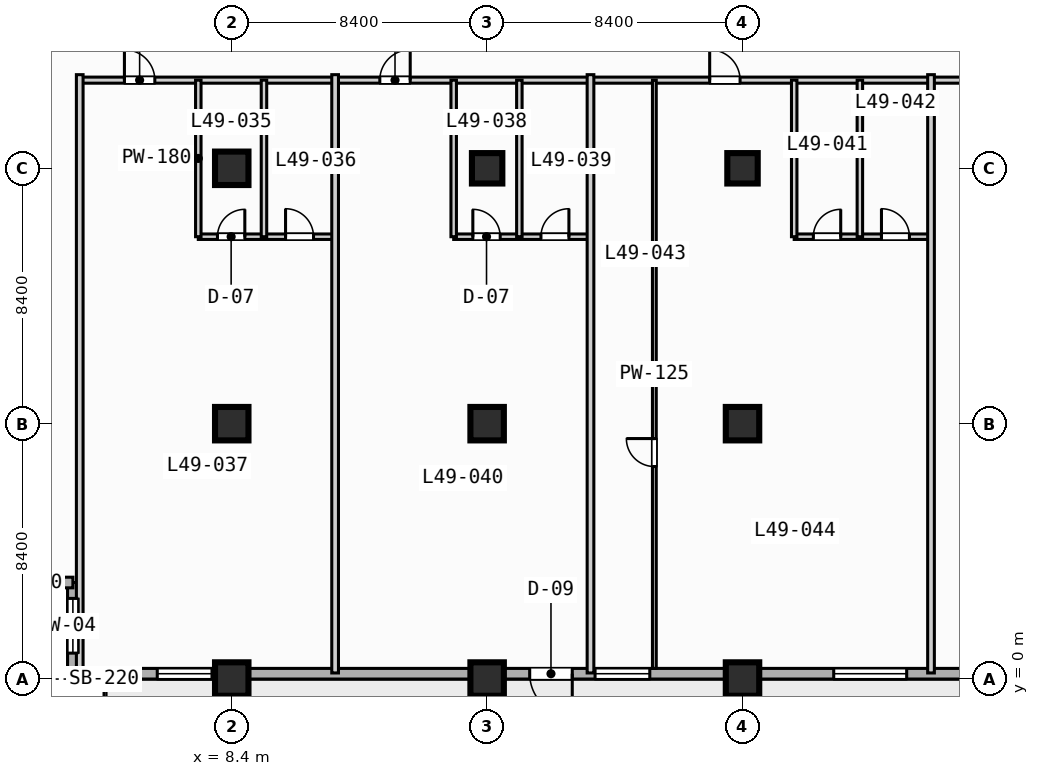
"""IFC4 building model, lengths in metres.
Left out: names, types, materials, properties, quantities, classifications, styles, units other than length and angle.
Written with IfcOpenShell. Run it as: python <this file> out.ifc"""

import sys

from ifc_helpers import new_model, si_unit, direction, frame, frame_2d, origin, origin_2d, place, context, subcontext, project, spatial, rectangle, extrude, element, fill, save


model = new_model("IFC4")
c1 = context("Model", 3, precision=1e-05, world=origin(), true_north=direction((0.0, 1.0)))
c2 = subcontext(c1, "Body", "Model", "MODEL_VIEW")
j1 = project(units=[si_unit("LENGTHUNIT", "METRE"), si_unit("PLANEANGLEUNIT", "RADIAN")], contexts=[c1])
p1 = place(None, origin())
s1 = spatial("IfcSite", under=j1, at=p1, CompositionType="ELEMENT")
p2 = place(p1, origin())
s2 = spatial("IfcBuilding", under=s1, at=p2, CompositionType="ELEMENT")
p3 = place(p2, frame((0.0, 0.0, 201.3)))
s3 = spatial("IfcBuildingStorey", under=s2, at=p3, CompositionType="ELEMENT", Elevation=201.3)
for number, where, z_axis, x_axis in (
    (1, (8.4, 0.0, 0.0), (0.0, 0.0, 1.0), (1.0, 0.0, 0.0)),
    (2, (8.4, 8.4, 0.0), (0.0, 0.0, 1.0), (1.0, 0.0, 0.0)),
    (3, (8.4, 16.8, 0.0), (0.0, 0.0, 1.0), (1.0, 0.0, 0.0)),
    (4, (16.8, 0.0, 0.0), (0.0, 0.0, 1.0), (1.0, 0.0, 0.0)),
    (5, (16.8, 8.4, 0.0), (0.0, 0.0, 1.0), (1.0, 0.0, 0.0)),
):
    element("IfcColumn", number, at=place(p3, frame(where, z_axis=z_axis, x_axis=x_axis)), inside=s3, PredefinedType="COLUMN", context=c2, shape_type="SweptSolid", body=[
        extrude(rectangle(XDim=1.1, YDim=1.1, at=origin_2d()), origin(), (0.0, 0.0, 1.0), 3.7),
    ])
p4 = place(p3, frame((16.8, 16.8, 0.0), z_axis=(0.0, 0.0, 1.0), x_axis=(1.0, 0.0, 0.0)))
e6 = element("IfcColumn", 6, at=p4, inside=s3, PredefinedType="COLUMN", context=c2, shape_type="SweptSolid", body=[
    extrude(rectangle(XDim=1.0, YDim=1.0, at=origin_2d()), origin(), (0.0, 0.0, 1.0), 3.7),
])
for number, where, z_axis, x_axis in (
    (7, (25.2, 0.0, 0.0), (0.0, 0.0, 1.0), (1.0, 0.0, 0.0)),
    (8, (25.2, 8.4, 0.0), (0.0, 0.0, 1.0), (1.0, 0.0, 0.0)),
):
    element("IfcColumn", number, at=place(p3, frame(where, z_axis=z_axis, x_axis=x_axis)), inside=s3, PredefinedType="COLUMN", context=c2, shape_type="SweptSolid", body=[
        extrude(rectangle(XDim=1.1, YDim=1.1, at=origin_2d()), origin(), (0.0, 0.0, 1.0), 3.7),
    ])
p5 = place(p3, frame((25.2, 16.8, 0.0), z_axis=(0.0, 0.0, 1.0), x_axis=(1.0, 0.0, 0.0)))
e9 = element("IfcColumn", 9, at=p5, inside=s3, PredefinedType="COLUMN", context=c2, shape_type="SweptSolid", body=[
    extrude(rectangle(XDim=1.0, YDim=1.0, at=origin_2d()), origin(), (0.0, 0.0, 1.0), 3.7),
])
p6 = place(p3, frame((3.175, 0.175, 0.0), z_axis=(0.0, 0.0, 1.0), x_axis=(0.0, 1.0, 0.0)))
e10 = element("IfcWall", 10, at=p6, inside=s3, PredefinedType="STANDARD", context=c2, shape_type="SweptSolid", body=[
    extrude(rectangle(XDim=3.0, YDim=0.35, at=frame_2d((1.5, 0.0))), origin(), (0.0, 0.0, 1.0), 3.47),
])
p7 = place(p6, frame((0.677, 0.0, 0.85)))
e11 = element("IfcOpeningElement", 11, at=p7, cuts=e10, PredefinedType="OPENING", context=c2, shape_type="SweptSolid", body=[
    extrude(rectangle(XDim=1.8, YDim=1.8, at=frame_2d((0.9, 0.9))), frame((0.0, 0.185, 0.0), z_axis=(0.0, -1.0, 0.0), x_axis=(1.0, 0.0, 0.0)), (0.0, 0.0, 1.0), 0.37),
])
p8 = place(p3, frame((3.175, 3.175, 0.0), z_axis=(0.0, 0.0, 1.0), x_axis=(-1.0, 0.0, 0.0)))
e12 = element("IfcWall", 12, at=p8, inside=s3, PredefinedType="STANDARD", context=c2, shape_type="SweptSolid", body=[
    extrude(rectangle(XDim=3.0, YDim=0.35, at=frame_2d((1.5, 0.0))), origin(), (0.0, 0.0, 1.0), 3.47),
])
p9 = place(p3, frame((72.425, 0.175, 0.0), z_axis=(0.0, 0.0, 1.0), x_axis=(-1.0, 0.0, 0.0)))
e13 = element("IfcWall", 13, at=p9, inside=s3, PredefinedType="STANDARD", context=c2, shape_type="SweptSolid", body=[
    extrude(rectangle(XDim=69.25, YDim=0.35, at=frame_2d((34.625, 0.0))), origin(), (0.0, 0.0, 1.0), 3.47),
])
p10 = place(p9, frame((52.825, 0.0, 0.0)))
e14 = element("IfcOpeningElement", 14, at=p10, cuts=e13, PredefinedType="OPENING", context=c2, shape_type="SweptSolid", body=[
    extrude(rectangle(XDim=1.4, YDim=2.2, at=frame_2d((0.7, 1.1))), frame((0.0, 0.185, 0.0), z_axis=(0.0, -1.0, 0.0), x_axis=(1.0, 0.0, 0.0)), (0.0, 0.0, 1.0), 0.37),
])
p11 = place(p9, frame((41.825, 0.0, 0.85)))
e15 = element("IfcOpeningElement", 15, at=p11, cuts=e13, PredefinedType="OPENING", context=c2, shape_type="SweptSolid", body=[
    extrude(rectangle(XDim=2.4, YDim=1.95, at=frame_2d((1.2, 0.975))), frame((0.0, 0.185, 0.0), z_axis=(0.0, -1.0, 0.0), x_axis=(1.0, 0.0, 0.0)), (0.0, 0.0, 1.0), 0.37),
])
p12 = place(p9, frame((33.725, 0.0, 0.85)))
e16 = element("IfcOpeningElement", 16, at=p12, cuts=e13, PredefinedType="OPENING", context=c2, shape_type="SweptSolid", body=[
    extrude(rectangle(XDim=1.8, YDim=1.8, at=frame_2d((0.9, 0.9))), frame((0.0, 0.185, 0.0), z_axis=(0.0, -1.0, 0.0), x_axis=(1.0, 0.0, 0.0)), (0.0, 0.0, 1.0), 0.37),
])
p13 = place(p9, frame((25.025, 0.0, 0.85)))
e17 = element("IfcOpeningElement", 17, at=p13, cuts=e13, PredefinedType="OPENING", context=c2, shape_type="SweptSolid", body=[
    extrude(rectangle(XDim=2.4, YDim=1.95, at=frame_2d((1.2, 0.975))), frame((0.0, 0.185, 0.0), z_axis=(0.0, -1.0, 0.0), x_axis=(1.0, 0.0, 0.0)), (0.0, 0.0, 1.0), 0.37),
])
p14 = place(p9, frame((64.675, 0.0, 0.85)))
e18 = element("IfcOpeningElement", 18, at=p14, cuts=e13, PredefinedType="OPENING", context=c2, shape_type="SweptSolid", body=[
    extrude(rectangle(XDim=1.8, YDim=1.8, at=frame_2d((0.9, 0.9))), frame((0.0, 0.185, 0.0), z_axis=(0.0, -1.0, 0.0), x_axis=(1.0, 0.0, 0.0)), (0.0, 0.0, 1.0), 0.37),
])
p15 = place(p9, frame((50.275, 0.0, 0.85)))
e19 = element("IfcOpeningElement", 19, at=p15, cuts=e13, PredefinedType="OPENING", context=c2, shape_type="SweptSolid", body=[
    extrude(rectangle(XDim=1.8, YDim=1.8, at=frame_2d((0.9, 0.9))), frame((0.0, 0.185, 0.0), z_axis=(0.0, -1.0, 0.0), x_axis=(1.0, 0.0, 0.0)), (0.0, 0.0, 1.0), 0.37),
])
p16 = place(p3, frame((3.4, 19.7, 0.0), z_axis=(0.0, 0.0, 1.0), x_axis=(1.0, 0.0, 0.0)))
e20 = element("IfcWall", 20, at=p16, inside=s3, PredefinedType="PARTITIONING", context=c2, shape_type="SweptSolid", body=[
    extrude(rectangle(XDim=35.8, YDim=0.2, at=frame_2d((17.9, 0.0))), origin(), (0.0, 0.0, 1.0), 3.47),
])
p17 = place(p16, frame((1.47, 0.0, 0.0)))
e21 = element("IfcOpeningElement", 21, at=p17, cuts=e20, PredefinedType="OPENING", context=c2, shape_type="SweptSolid", body=[
    extrude(rectangle(XDim=1.0, YDim=2.15, at=frame_2d((0.5, 1.075))), frame((0.0, 0.11, 0.0), z_axis=(0.0, -1.0, 0.0), x_axis=(1.0, 0.0, 0.0)), (0.0, 0.0, 1.0), 0.22),
])
p18 = place(p16, frame((9.87, 0.0, 0.0)))
e22 = element("IfcOpeningElement", 22, at=p18, cuts=e20, PredefinedType="OPENING", context=c2, shape_type="SweptSolid", body=[
    extrude(rectangle(XDim=1.0, YDim=2.15, at=frame_2d((0.5, 1.075))), frame((0.0, 0.11, 0.0), z_axis=(0.0, -1.0, 0.0), x_axis=(1.0, 0.0, 0.0)), (0.0, 0.0, 1.0), 0.22),
])
p19 = place(p16, frame((20.72, 0.0, 0.0)))
e23 = element("IfcOpeningElement", 23, at=p19, cuts=e20, PredefinedType="OPENING", context=c2, shape_type="SweptSolid", body=[
    extrude(rectangle(XDim=1.0, YDim=2.15, at=frame_2d((0.5, 1.075))), frame((0.0, 0.11, 0.0), z_axis=(0.0, -1.0, 0.0), x_axis=(1.0, 0.0, 0.0)), (0.0, 0.0, 1.0), 0.22),
])
p20 = place(p16, frame((29.17, 0.0, 0.0)))
e24 = element("IfcOpeningElement", 24, at=p20, cuts=e20, PredefinedType="OPENING", context=c2, shape_type="SweptSolid", body=[
    extrude(rectangle(XDim=1.0, YDim=2.15, at=frame_2d((0.5, 1.075))), frame((0.0, 0.11, 0.0), z_axis=(0.0, -1.0, 0.0), x_axis=(1.0, 0.0, 0.0)), (0.0, 0.0, 1.0), 0.22),
])
p21 = place(p3, frame((3.4, 0.2, 0.0), z_axis=(0.0, 0.0, 1.0), x_axis=(0.0, 1.0, 0.0)))
e25 = element("IfcWall", 25, at=p21, inside=s3, PredefinedType="PARTITIONING", context=c2, shape_type="SweptSolid", body=[
    extrude(rectangle(XDim=19.68, YDim=0.22, at=frame_2d((9.84, 0.0))), origin(), (0.0, 0.0, 1.0), 3.47),
])
p22 = place(p3, frame((7.3, 14.55, 0.0), z_axis=(0.0, 0.0, 1.0), x_axis=(1.0, 0.0, 0.0)))
e26 = element("IfcWall", 26, at=p22, inside=s3, PredefinedType="PLUMBINGWALL", context=c2, shape_type="SweptSolid", body=[
    extrude(rectangle(XDim=4.5, YDim=0.18, at=frame_2d((2.25, 0.0))), origin(), (0.0, 0.0, 1.0), 3.47),
])
p23 = place(p22, frame((0.63, 0.0, 0.0)))
e27 = element("IfcOpeningElement", 27, at=p23, cuts=e26, PredefinedType="OPENING", context=c2, shape_type="SweptSolid", body=[
    extrude(rectangle(XDim=0.9, YDim=2.1, at=frame_2d((0.45, 1.05))), frame((0.0, 0.1, 0.0), z_axis=(0.0, -1.0, 0.0), x_axis=(1.0, 0.0, 0.0)), (0.0, 0.0, 1.0), 0.2),
])
p24 = place(p22, frame((2.87, 0.0, 0.0)))
e28 = element("IfcOpeningElement", 28, at=p24, cuts=e26, PredefinedType="OPENING", context=c2, shape_type="SweptSolid", body=[
    extrude(rectangle(XDim=0.92, YDim=2.1, at=frame_2d((0.46, 1.05))), frame((0.0, 0.1, 0.0), z_axis=(0.0, -1.0, 0.0), x_axis=(1.0, 0.0, 0.0)), (0.0, 0.0, 1.0), 0.2),
])
for number, where, z_axis, x_axis in (
    (29, (7.3, 14.55, 0.0), (0.0, 0.0, 1.0), (0.0, 1.0, 0.0)),
    (30, (9.46, 14.55, 0.0), (0.0, 0.0, 1.0), (0.0, 1.0, 0.0)),
):
    element("IfcWall", number, at=place(p3, frame(where, z_axis=z_axis, x_axis=x_axis)), inside=s3, PredefinedType="PLUMBINGWALL", context=c2, shape_type="SweptSolid", body=[
        extrude(rectangle(XDim=5.15, YDim=0.18, at=frame_2d((2.575, 0.0))), origin(), (0.0, 0.0, 1.0), 3.47),
    ])
p25 = place(p3, frame((11.8, 0.2, 0.0), z_axis=(0.0, 0.0, 1.0), x_axis=(0.0, 1.0, 0.0)))
e31 = element("IfcWall", 31, at=p25, inside=s3, PredefinedType="PARTITIONING", context=c2, shape_type="SweptSolid", body=[
    extrude(rectangle(XDim=19.68, YDim=0.22, at=frame_2d((9.84, 0.0))), origin(), (0.0, 0.0, 1.0), 3.47),
])
p26 = place(p3, frame((15.7, 14.55, 0.0), z_axis=(0.0, 0.0, 1.0), x_axis=(1.0, 0.0, 0.0)))
e32 = element("IfcWall", 32, at=p26, inside=s3, PredefinedType="PLUMBINGWALL", context=c2, shape_type="SweptSolid", body=[
    extrude(rectangle(XDim=4.5, YDim=0.18, at=frame_2d((2.25, 0.0))), origin(), (0.0, 0.0, 1.0), 3.47),
])
p27 = place(p26, frame((0.63, 0.0, 0.0)))
e33 = element("IfcOpeningElement", 33, at=p27, cuts=e32, PredefinedType="OPENING", context=c2, shape_type="SweptSolid", body=[
    extrude(rectangle(XDim=0.9, YDim=2.1, at=frame_2d((0.45, 1.05))), frame((0.0, 0.1, 0.0), z_axis=(0.0, -1.0, 0.0), x_axis=(1.0, 0.0, 0.0)), (0.0, 0.0, 1.0), 0.2),
])
p28 = place(p26, frame((2.87, 0.0, 0.0)))
e34 = element("IfcOpeningElement", 34, at=p28, cuts=e32, PredefinedType="OPENING", context=c2, shape_type="SweptSolid", body=[
    extrude(rectangle(XDim=0.92, YDim=2.1, at=frame_2d((0.46, 1.05))), frame((0.0, 0.1, 0.0), z_axis=(0.0, -1.0, 0.0), x_axis=(1.0, 0.0, 0.0)), (0.0, 0.0, 1.0), 0.2),
])
for number, where, z_axis, x_axis in (
    (35, (15.7, 14.55, 0.0), (0.0, 0.0, 1.0), (0.0, 1.0, 0.0)),
    (36, (17.86, 14.55, 0.0), (0.0, 0.0, 1.0), (0.0, 1.0, 0.0)),
):
    element("IfcWall", number, at=place(p3, frame(where, z_axis=z_axis, x_axis=x_axis)), inside=s3, PredefinedType="PLUMBINGWALL", context=c2, shape_type="SweptSolid", body=[
        extrude(rectangle(XDim=5.15, YDim=0.18, at=frame_2d((2.575, 0.0))), origin(), (0.0, 0.0, 1.0), 3.47),
    ])
p29 = place(p3, frame((20.2, 0.2, 0.0), z_axis=(0.0, 0.0, 1.0), x_axis=(0.0, 1.0, 0.0)))
e37 = element("IfcWall", 37, at=p29, inside=s3, PredefinedType="PARTITIONING", context=c2, shape_type="SweptSolid", body=[
    extrude(rectangle(XDim=19.68, YDim=0.22, at=frame_2d((9.84, 0.0))), origin(), (0.0, 0.0, 1.0), 3.47),
])
p30 = place(p3, frame((26.9, 14.55, 0.0), z_axis=(0.0, 0.0, 1.0), x_axis=(1.0, 0.0, 0.0)))
e38 = element("IfcWall", 38, at=p30, inside=s3, PredefinedType="PLUMBINGWALL", context=c2, shape_type="SweptSolid", body=[
    extrude(rectangle(XDim=4.5, YDim=0.18, at=frame_2d((2.25, 0.0))), origin(), (0.0, 0.0, 1.0), 3.47),
])
p31 = place(p30, frame((0.63, 0.0, 0.0)))
e39 = element("IfcOpeningElement", 39, at=p31, cuts=e38, PredefinedType="OPENING", context=c2, shape_type="SweptSolid", body=[
    extrude(rectangle(XDim=0.9, YDim=2.1, at=frame_2d((0.45, 1.05))), frame((0.0, 0.1, 0.0), z_axis=(0.0, -1.0, 0.0), x_axis=(1.0, 0.0, 0.0)), (0.0, 0.0, 1.0), 0.2),
])
p32 = place(p30, frame((2.87, 0.0, 0.0)))
e40 = element("IfcOpeningElement", 40, at=p32, cuts=e38, PredefinedType="OPENING", context=c2, shape_type="SweptSolid", body=[
    extrude(rectangle(XDim=0.92, YDim=2.1, at=frame_2d((0.46, 1.05))), frame((0.0, 0.1, 0.0), z_axis=(0.0, -1.0, 0.0), x_axis=(1.0, 0.0, 0.0)), (0.0, 0.0, 1.0), 0.2),
])
for number, where, z_axis, x_axis in (
    (41, (26.9, 14.55, 0.0), (0.0, 0.0, 1.0), (0.0, 1.0, 0.0)),
    (42, (29.06, 14.55, 0.0), (0.0, 0.0, 1.0), (0.0, 1.0, 0.0)),
):
    element("IfcWall", number, at=place(p3, frame(where, z_axis=z_axis, x_axis=x_axis)), inside=s3, PredefinedType="PLUMBINGWALL", context=c2, shape_type="SweptSolid", body=[
        extrude(rectangle(XDim=5.15, YDim=0.18, at=frame_2d((2.575, 0.0))), origin(), (0.0, 0.0, 1.0), 3.47),
    ])
p33 = place(p3, frame((22.3, 0.35, 0.0), z_axis=(0.0, 0.0, 1.0), x_axis=(0.0, 1.0, 0.0)))
e43 = element("IfcWall", 43, at=p33, inside=s3, PredefinedType="PARTITIONING", context=c2, shape_type="SweptSolid", body=[
    extrude(rectangle(XDim=19.35, YDim=0.125, at=frame_2d((9.675, 0.0))), origin(), (0.0, 0.0, 1.0), 3.47),
])
p34 = place(p33, frame((6.64, 0.0, 0.0)))
e44 = element("IfcOpeningElement", 44, at=p34, cuts=e43, PredefinedType="OPENING", context=c2, shape_type="SweptSolid", body=[
    extrude(rectangle(XDim=0.92, YDim=2.1, at=frame_2d((0.46, 1.05))), frame((0.0, 0.073, 0.0), z_axis=(0.0, -1.0, 0.0), x_axis=(1.0, 0.0, 0.0)), (0.0, 0.0, 1.0), 0.145),
])
p35 = place(p3, frame((31.4, 0.2, 0.0), z_axis=(0.0, 0.0, 1.0), x_axis=(0.0, 1.0, 0.0)))
e45 = element("IfcWall", 45, at=p35, inside=s3, PredefinedType="PARTITIONING", context=c2, shape_type="SweptSolid", body=[
    extrude(rectangle(XDim=19.68, YDim=0.22, at=frame_2d((9.84, 0.0))), origin(), (0.0, 0.0, 1.0), 3.47),
])
p36 = place(p7, origin())
e46 = element("IfcWindow", 46, at=p36, inside=s3, PartitioningType="SINGLE_PANEL", PredefinedType="WINDOW", context=c2, shape_type="SweptSolid", body=[
    extrude(rectangle(XDim=1.8, YDim=1.8, at=frame_2d((0.9, 0.9))), frame((0.0, 0.03, 0.0), z_axis=(0.0, -1.0, 0.0), x_axis=(1.0, 0.0, 0.0)), (0.0, 0.0, 1.0), 0.06),
])
fill(e11, e46)
p37 = place(p10, origin())
e47 = element("IfcDoor", 47, at=p37, inside=s3, OperationType="SINGLE_SWING_LEFT", PredefinedType="DOOR", context=c2, shape_type="SweptSolid", body=[
    extrude(rectangle(XDim=1.4, YDim=2.2, at=frame_2d((0.7, 1.1))), frame((0.0, 0.025, 0.0), z_axis=(0.0, -1.0, 0.0), x_axis=(1.0, 0.0, 0.0)), (0.0, 0.0, 1.0), 0.05),
])
fill(e14, e47)
p38 = place(p11, origin())
e48 = element("IfcWindow", 48, at=p38, inside=s3, PartitioningType="SINGLE_PANEL", PredefinedType="WINDOW", context=c2, shape_type="SweptSolid", body=[
    extrude(rectangle(XDim=2.4, YDim=1.95, at=frame_2d((1.2, 0.975))), frame((0.0, 0.03, 0.0), z_axis=(0.0, -1.0, 0.0), x_axis=(1.0, 0.0, 0.0)), (0.0, 0.0, 1.0), 0.06),
])
fill(e15, e48)
p39 = place(p14, origin())
e49 = element("IfcWindow", 49, at=p39, inside=s3, PartitioningType="SINGLE_PANEL", PredefinedType="WINDOW", context=c2, shape_type="SweptSolid", body=[
    extrude(rectangle(XDim=1.8, YDim=1.8, at=frame_2d((0.9, 0.9))), frame((0.0, 0.03, 0.0), z_axis=(0.0, -1.0, 0.0), x_axis=(1.0, 0.0, 0.0)), (0.0, 0.0, 1.0), 0.06),
])
fill(e18, e49)
p40 = place(p15, origin())
e50 = element("IfcWindow", 50, at=p40, inside=s3, PartitioningType="SINGLE_PANEL", PredefinedType="WINDOW", context=c2, shape_type="SweptSolid", body=[
    extrude(rectangle(XDim=1.8, YDim=1.8, at=frame_2d((0.9, 0.9))), frame((0.0, 0.03, 0.0), z_axis=(0.0, -1.0, 0.0), x_axis=(1.0, 0.0, 0.0)), (0.0, 0.0, 1.0), 0.06),
])
fill(e19, e50)
p41 = place(p17, origin())
e51 = element("IfcDoor", 51, at=p41, inside=s3, OperationType="SINGLE_SWING_LEFT", PredefinedType="DOOR", context=c2, shape_type="SweptSolid", body=[
    extrude(rectangle(XDim=1.0, YDim=2.15, at=frame_2d((0.5, 1.075))), frame((0.0, 0.025, 0.0), z_axis=(0.0, -1.0, 0.0), x_axis=(1.0, 0.0, 0.0)), (0.0, 0.0, 1.0), 0.05),
])
fill(e21, e51)
p42 = place(p18, origin())
e52 = element("IfcDoor", 52, at=p42, inside=s3, OperationType="SINGLE_SWING_RIGHT", PredefinedType="DOOR", context=c2, shape_type="SweptSolid", body=[
    extrude(rectangle(XDim=1.0, YDim=2.15, at=frame_2d((0.5, 1.075))), frame((0.0, 0.025, 0.0), z_axis=(0.0, -1.0, 0.0), x_axis=(1.0, 0.0, 0.0)), (0.0, 0.0, 1.0), 0.05),
])
fill(e22, e52)
p43 = place(p19, origin())
e53 = element("IfcDoor", 53, at=p43, inside=s3, OperationType="SINGLE_SWING_LEFT", PredefinedType="DOOR", context=c2, shape_type="SweptSolid", body=[
    extrude(rectangle(XDim=1.0, YDim=2.15, at=frame_2d((0.5, 1.075))), frame((0.0, 0.025, 0.0), z_axis=(0.0, -1.0, 0.0), x_axis=(1.0, 0.0, 0.0)), (0.0, 0.0, 1.0), 0.05),
])
fill(e23, e53)
p44 = place(p23, origin())
e54 = element("IfcDoor", 54, at=p44, inside=s3, OperationType="SINGLE_SWING_RIGHT", PredefinedType="DOOR", context=c2, shape_type="SweptSolid", body=[
    extrude(rectangle(XDim=0.9, YDim=2.1, at=frame_2d((0.45, 1.05))), frame((0.0, 0.025, 0.0), z_axis=(0.0, -1.0, 0.0), x_axis=(1.0, 0.0, 0.0)), (0.0, 0.0, 1.0), 0.05),
])
fill(e27, e54)
p45 = place(p24, origin())
e55 = element("IfcDoor", 55, at=p45, inside=s3, OperationType="SINGLE_SWING_LEFT", PredefinedType="DOOR", context=c2, shape_type="SweptSolid", body=[
    extrude(rectangle(XDim=0.92, YDim=2.1, at=frame_2d((0.46, 1.05))), frame((0.0, 0.025, 0.0), z_axis=(0.0, -1.0, 0.0), x_axis=(1.0, 0.0, 0.0)), (0.0, 0.0, 1.0), 0.05),
])
fill(e28, e55)
p46 = place(p27, origin())
e56 = element("IfcDoor", 56, at=p46, inside=s3, OperationType="SINGLE_SWING_LEFT", PredefinedType="DOOR", context=c2, shape_type="SweptSolid", body=[
    extrude(rectangle(XDim=0.9, YDim=2.1, at=frame_2d((0.45, 1.05))), frame((0.0, 0.025, 0.0), z_axis=(0.0, -1.0, 0.0), x_axis=(1.0, 0.0, 0.0)), (0.0, 0.0, 1.0), 0.05),
])
fill(e33, e56)
p47 = place(p28, origin())
e57 = element("IfcDoor", 57, at=p47, inside=s3, OperationType="SINGLE_SWING_RIGHT", PredefinedType="DOOR", context=c2, shape_type="SweptSolid", body=[
    extrude(rectangle(XDim=0.92, YDim=2.1, at=frame_2d((0.46, 1.05))), frame((0.0, 0.025, 0.0), z_axis=(0.0, -1.0, 0.0), x_axis=(1.0, 0.0, 0.0)), (0.0, 0.0, 1.0), 0.05),
])
fill(e34, e57)
p48 = place(p31, origin())
e58 = element("IfcDoor", 58, at=p48, inside=s3, OperationType="SINGLE_SWING_RIGHT", PredefinedType="DOOR", context=c2, shape_type="SweptSolid", body=[
    extrude(rectangle(XDim=0.9, YDim=2.1, at=frame_2d((0.45, 1.05))), frame((0.0, 0.025, 0.0), z_axis=(0.0, -1.0, 0.0), x_axis=(1.0, 0.0, 0.0)), (0.0, 0.0, 1.0), 0.05),
])
fill(e39, e58)
p49 = place(p32, origin())
e59 = element("IfcDoor", 59, at=p49, inside=s3, OperationType="SINGLE_SWING_LEFT", PredefinedType="DOOR", context=c2, shape_type="SweptSolid", body=[
    extrude(rectangle(XDim=0.92, YDim=2.1, at=frame_2d((0.46, 1.05))), frame((0.0, 0.025, 0.0), z_axis=(0.0, -1.0, 0.0), x_axis=(1.0, 0.0, 0.0)), (0.0, 0.0, 1.0), 0.05),
])
fill(e40, e59)
p50 = place(p34, origin())
e60 = element("IfcDoor", 60, at=p50, inside=s3, OperationType="SINGLE_SWING_RIGHT", PredefinedType="DOOR", context=c2, shape_type="SweptSolid", body=[
    extrude(rectangle(XDim=0.92, YDim=2.1, at=frame_2d((0.46, 1.05))), frame((0.0, 0.025, 0.0), z_axis=(0.0, -1.0, 0.0), x_axis=(1.0, 0.0, 0.0)), (0.0, 0.0, 1.0), 0.05),
])
fill(e44, e60)
save(model, sys.argv[1])
